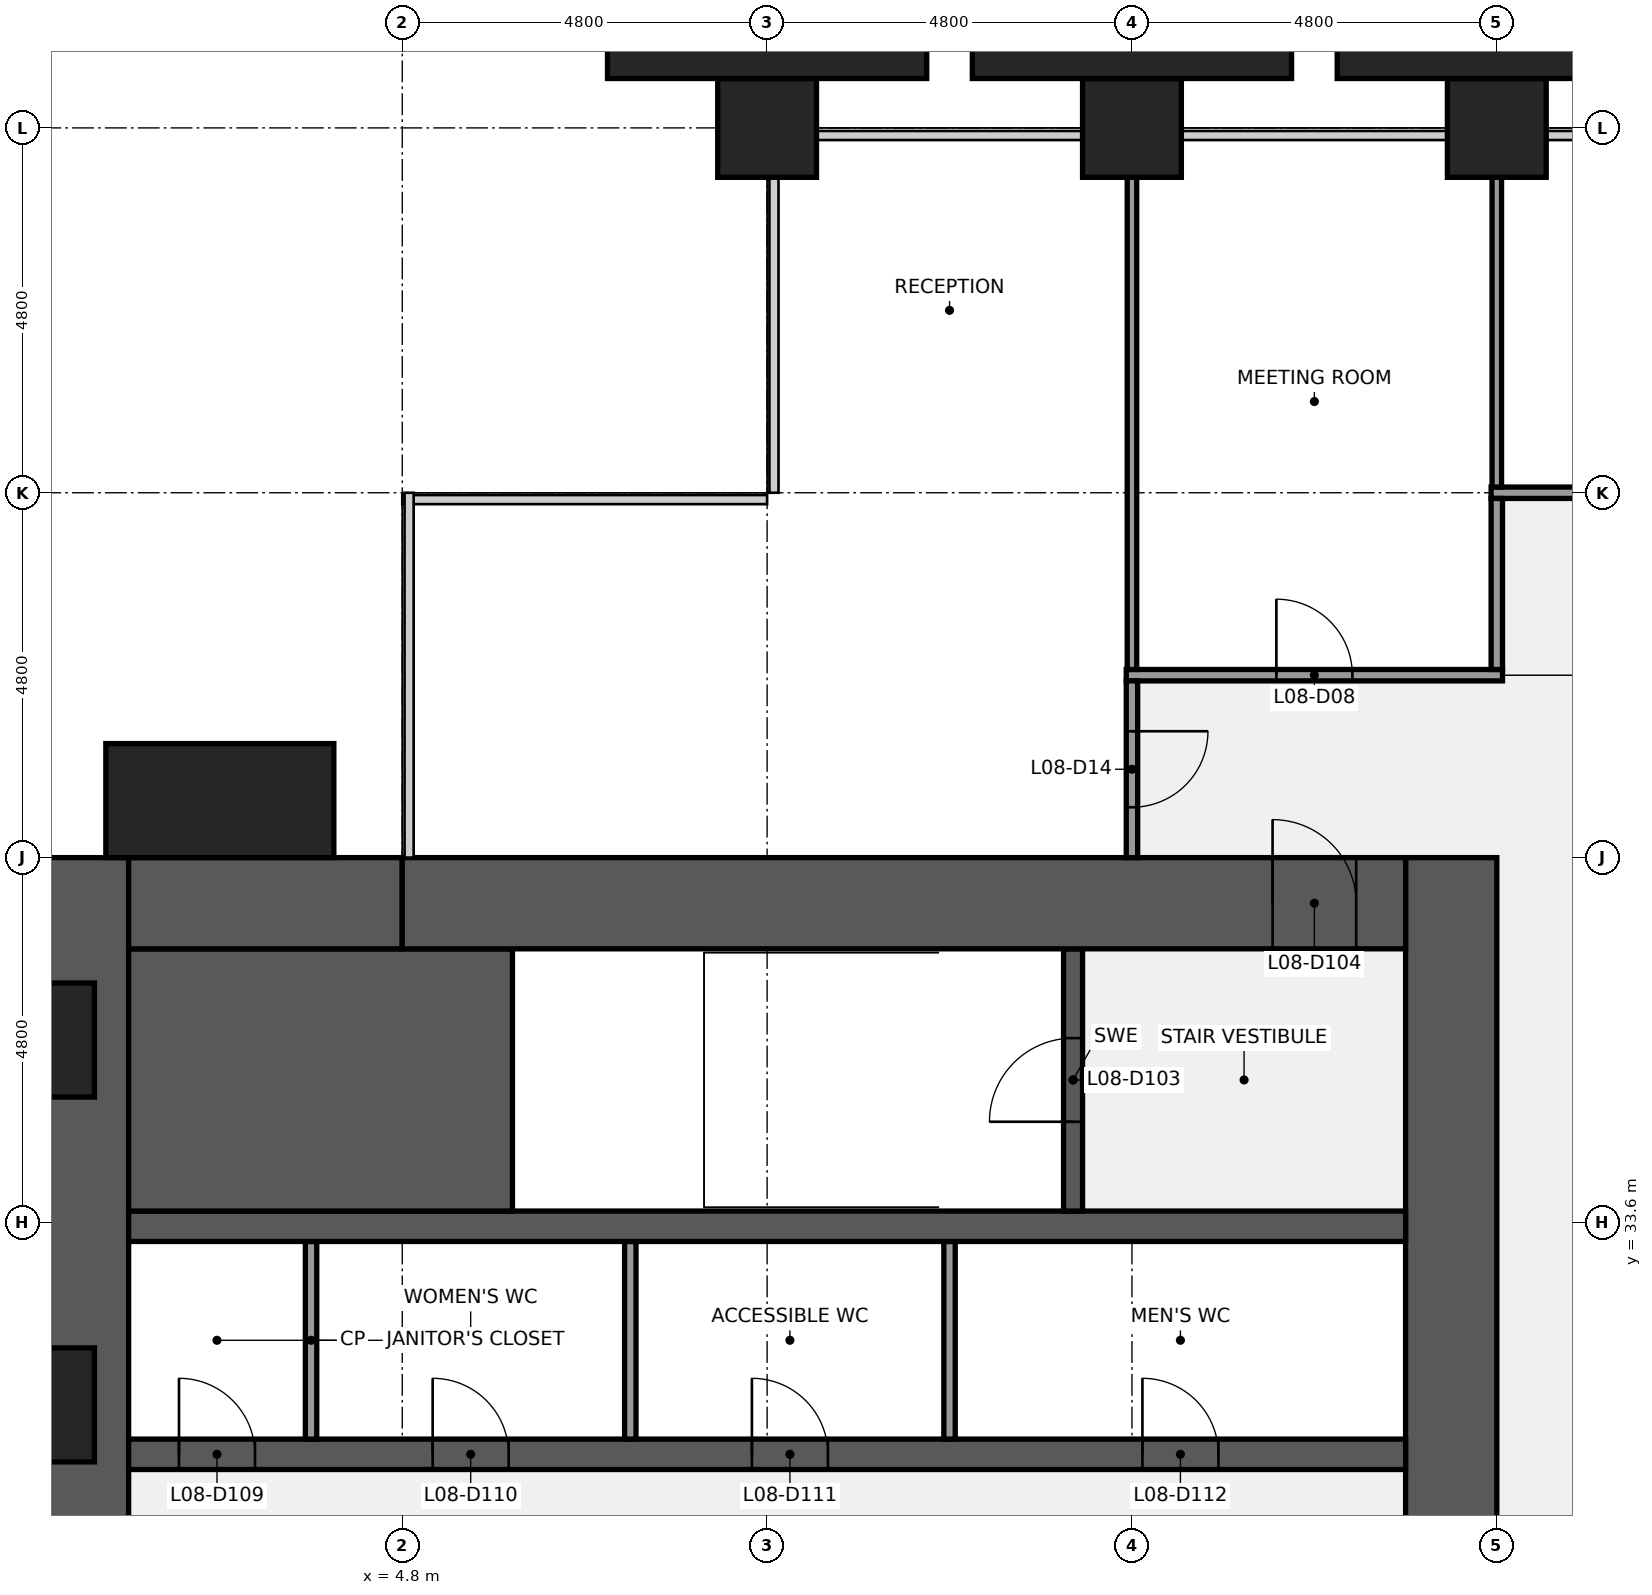
"""IFC4 building model, lengths in metres.
Left out: names, types, materials, properties, quantities, classifications, styles, units other than length and angle.
Written with IfcOpenShell. Run it as: python <this file> out.ifc"""

import sys

from ifc_helpers import new_model, si_unit, direction, frame, frame_2d, origin, origin_2d, place, context, subcontext, project, spatial, rectangle, extrude, element, fill, save


model = new_model("IFC4")
c1 = context("Model", 3, precision=1e-05, world=origin(), true_north=direction((0.0, 1.0)))
c2 = subcontext(c1, "Body", "Model", "MODEL_VIEW")
j1 = project(units=[si_unit("LENGTHUNIT", "METRE"), si_unit("PLANEANGLEUNIT", "RADIAN")], contexts=[c1])
p1 = place(None, origin())
s1 = spatial("IfcSite", under=j1, at=p1, CompositionType="ELEMENT")
p2 = place(p1, origin())
s2 = spatial("IfcBuilding", under=s1, at=p2, CompositionType="ELEMENT")
p3 = place(p2, frame((0.0, 0.0, 43.0)))
s3 = spatial("IfcBuildingStorey", under=s2, at=p3, CompositionType="ELEMENT", Elevation=43.0)
for number, where, z_axis, x_axis in (
    (1, (9.6, 48.0, 0.0), (0.0, 0.0, 1.0), (1.0, 0.0, 0.0)),
    (2, (14.4, 48.0, 0.0), (0.0, 0.0, 1.0), (1.0, 0.0, 0.0)),
    (3, (19.2, 48.0, 0.0), (0.0, 0.0, 1.0), (1.0, 0.0, 0.0)),
):
    element("IfcColumn", number, at=place(p3, frame(where, z_axis=z_axis, x_axis=x_axis)), inside=s3, PredefinedType="COLUMN", context=c2, shape_type="SweptSolid", body=[
        extrude(rectangle(XDim=1.3, YDim=1.3, at=origin_2d()), origin(), (0.0, 0.0, 1.0), 4.0),
    ])
p4 = place(p3, frame((0.6, 9.6, 0.0), z_axis=(0.0, 0.0, 1.0), x_axis=(0.0, 1.0, 0.0)))
e4 = element("IfcWall", 4, at=p4, inside=s3, PredefinedType="SHEAR", context=c2, shape_type="SweptSolid", body=[
    extrude(rectangle(XDim=28.8, YDim=1.2, at=frame_2d((14.4, 0.0))), origin(), (0.0, 0.0, 1.0), 3.84),
])
p5 = place(p4, frame((8.85, 0.0, 0.9)))
e5 = element("IfcOpeningElement", 5, at=p5, cuts=e4, PredefinedType="OPENING", context=c2, shape_type="SweptSolid", body=[
    extrude(rectangle(XDim=1.5, YDim=1.5, at=frame_2d((0.75, 0.75))), frame((0.0, 0.61, 0.0), z_axis=(0.0, -1.0, 0.0), x_axis=(1.0, 0.0, 0.0)), (0.0, 0.0, 1.0), 1.22),
])
p6 = place(p4, frame((18.45, 0.0, 0.9)))
e6 = element("IfcOpeningElement", 6, at=p6, cuts=e4, PredefinedType="OPENING", context=c2, shape_type="SweptSolid", body=[
    extrude(rectangle(XDim=1.5, YDim=1.5, at=frame_2d((0.75, 0.75))), frame((0.0, 0.61, 0.0), z_axis=(0.0, -1.0, 0.0), x_axis=(1.0, 0.0, 0.0)), (0.0, 0.0, 1.0), 1.22),
])
p7 = place(p3, frame((18.6, 38.4, 0.0), z_axis=(0.0, 0.0, 1.0), x_axis=(0.0, -1.0, 0.0)))
e7 = element("IfcWall", 7, at=p7, inside=s3, PredefinedType="SHEAR", context=c2, shape_type="SweptSolid", body=[
    extrude(rectangle(XDim=28.8, YDim=1.2, at=frame_2d((14.4, 0.0))), origin(), (0.0, 0.0, 1.0), 3.84),
])
p8 = place(p7, frame((18.3, 0.0, 0.0)))
e8 = element("IfcOpeningElement", 8, at=p8, cuts=e7, PredefinedType="OPENING", context=c2, shape_type="SweptSolid", body=[
    extrude(rectangle(XDim=1.8, YDim=2.1, at=frame_2d((0.9, 1.05))), frame((0.0, 0.61, 0.0), z_axis=(0.0, -1.0, 0.0), x_axis=(1.0, 0.0, 0.0)), (0.0, 0.0, 1.0), 1.22),
])
p9 = place(p7, frame((8.7, 0.0, 0.0)))
e9 = element("IfcOpeningElement", 9, at=p9, cuts=e7, PredefinedType="OPENING", context=c2, shape_type="SweptSolid", body=[
    extrude(rectangle(XDim=1.8, YDim=2.1, at=frame_2d((0.9, 1.05))), frame((0.0, 0.61, 0.0), z_axis=(0.0, -1.0, 0.0), x_axis=(1.0, 0.0, 0.0)), (0.0, 0.0, 1.0), 1.22),
])
p10 = place(p3, frame((1.2, 30.55, 0.0), z_axis=(0.0, 0.0, 1.0), x_axis=(1.0, 0.0, 0.0)))
e10 = element("IfcWall", 10, at=p10, inside=s3, PredefinedType="SHEAR", context=c2, shape_type="SweptSolid", body=[
    extrude(rectangle(XDim=16.8, YDim=0.4, at=frame_2d((8.4, 0.0))), origin(), (0.0, 0.0, 1.0), 3.84),
])
p11 = place(p10, frame((0.663, 0.0, 0.0)))
e11 = element("IfcOpeningElement", 11, at=p11, cuts=e10, PredefinedType="OPENING", context=c2, shape_type="SweptSolid", body=[
    extrude(rectangle(XDim=1.0, YDim=2.1, at=frame_2d((0.5, 1.05))), frame((0.0, 0.21, 0.0), z_axis=(0.0, -1.0, 0.0), x_axis=(1.0, 0.0, 0.0)), (0.0, 0.0, 1.0), 0.42),
])
p12 = place(p10, frame((4.0, 0.0, 0.0)))
e12 = element("IfcOpeningElement", 12, at=p12, cuts=e10, PredefinedType="OPENING", context=c2, shape_type="SweptSolid", body=[
    extrude(rectangle(XDim=1.0, YDim=2.1, at=frame_2d((0.5, 1.05))), frame((0.0, 0.21, 0.0), z_axis=(0.0, -1.0, 0.0), x_axis=(1.0, 0.0, 0.0)), (0.0, 0.0, 1.0), 0.42),
])
p13 = place(p10, frame((8.2, 0.0, 0.0)))
e13 = element("IfcOpeningElement", 13, at=p13, cuts=e10, PredefinedType="OPENING", context=c2, shape_type="SweptSolid", body=[
    extrude(rectangle(XDim=1.0, YDim=2.1, at=frame_2d((0.5, 1.05))), frame((0.0, 0.21, 0.0), z_axis=(0.0, -1.0, 0.0), x_axis=(1.0, 0.0, 0.0)), (0.0, 0.0, 1.0), 0.42),
])
p14 = place(p10, frame((13.337, 0.0, 0.0)))
e14 = element("IfcOpeningElement", 14, at=p14, cuts=e10, PredefinedType="OPENING", context=c2, shape_type="SweptSolid", body=[
    extrude(rectangle(XDim=1.0, YDim=2.1, at=frame_2d((0.5, 1.05))), frame((0.0, 0.21, 0.0), z_axis=(0.0, -1.0, 0.0), x_axis=(1.0, 0.0, 0.0)), (0.0, 0.0, 1.0), 0.42),
])
for number, where, z_axis, x_axis in (
    (15, (3.6, 30.75, 0.0), (0.0, 0.0, 1.0), (0.0, 1.0, 0.0)),
    (16, (7.8, 30.75, 0.0), (0.0, 0.0, 1.0), (0.0, 1.0, 0.0)),
    (17, (12.0, 30.75, 0.0), (0.0, 0.0, 1.0), (0.0, 1.0, 0.0)),
):
    element("IfcWall", number, at=place(p3, frame(where, z_axis=z_axis, x_axis=x_axis)), inside=s3, PredefinedType="PARTITIONING", context=c2, shape_type="SweptSolid", body=[
        extrude(rectangle(XDim=2.6, YDim=0.15, at=frame_2d((1.3, 0.0))), origin(), (0.0, 0.0, 1.0), 3.84),
    ])
p15 = place(p3, frame((1.2, 33.55, 0.0), z_axis=(0.0, 0.0, 1.0), x_axis=(1.0, 0.0, 0.0)))
e18 = element("IfcWall", 18, at=p15, inside=s3, PredefinedType="SHEAR", context=c2, shape_type="SweptSolid", body=[
    extrude(rectangle(XDim=16.8, YDim=0.4, at=frame_2d((8.4, 0.0))), origin(), (0.0, 0.0, 1.0), 3.84),
])
p16 = place(p3, frame((1.2, 35.475, 0.0), z_axis=(0.0, 0.0, 1.0), x_axis=(1.0, 0.0, 0.0)))
e19 = element("IfcWall", 19, at=p16, inside=s3, PredefinedType="SHEAR", context=c2, shape_type="SweptSolid", body=[
    extrude(rectangle(XDim=5.05, YDim=3.45, at=frame_2d((2.525, 0.0))), origin(), (0.0, 0.0, 1.0), 3.84),
])
p17 = place(p3, frame((13.625, 33.75, 0.0), z_axis=(0.0, 0.0, 1.0), x_axis=(0.0, 1.0, 0.0)))
e20 = element("IfcWall", 20, at=p17, inside=s3, PredefinedType="SHEAR", context=c2, shape_type="SweptSolid", body=[
    extrude(rectangle(XDim=3.45, YDim=0.25, at=frame_2d((1.725, 0.0))), origin(), (0.0, 0.0, 1.0), 3.84),
])
p18 = place(p17, frame((1.175, 0.0, 0.0)))
e21 = element("IfcOpeningElement", 21, at=p18, cuts=e20, PredefinedType="OPENING", context=c2, shape_type="SweptSolid", body=[
    extrude(rectangle(XDim=1.1, YDim=2.1, at=frame_2d((0.55, 1.05))), frame((0.0, 0.135, 0.0), z_axis=(0.0, -1.0, 0.0), x_axis=(1.0, 0.0, 0.0)), (0.0, 0.0, 1.0), 0.27),
])
p19 = place(p3, frame((1.2, 37.8, 0.0), z_axis=(0.0, 0.0, 1.0), x_axis=(1.0, 0.0, 0.0)))
e22 = element("IfcWall", 22, at=p19, inside=s3, PredefinedType="SHEAR", context=c2, shape_type="SweptSolid", body=[
    extrude(rectangle(XDim=3.6, YDim=1.2, at=frame_2d((1.8, 0.0))), origin(), (0.0, 0.0, 1.0), 3.84),
])
p20 = place(p3, frame((4.8, 37.8, 0.0), z_axis=(0.0, 0.0, 1.0), x_axis=(1.0, 0.0, 0.0)))
e23 = element("IfcWall", 23, at=p20, inside=s3, PredefinedType="SHEAR", context=c2, shape_type="SweptSolid", body=[
    extrude(rectangle(XDim=13.2, YDim=1.2, at=frame_2d((6.6, 0.0))), origin(), (0.0, 0.0, 1.0), 3.84),
])
p21 = place(p20, frame((11.45, 0.0, 0.0)))
e24 = element("IfcOpeningElement", 24, at=p21, cuts=e23, PredefinedType="OPENING", context=c2, shape_type="SweptSolid", body=[
    extrude(rectangle(XDim=1.1, YDim=2.1, at=frame_2d((0.55, 1.05))), frame((0.0, 0.61, 0.0), z_axis=(0.0, -1.0, 0.0), x_axis=(1.0, 0.0, 0.0)), (0.0, 0.0, 1.0), 1.22),
])
p22 = place(p3, frame((14.325, 40.8, 0.0), z_axis=(0.0, 0.0, 1.0), x_axis=(1.0, 0.0, 0.0)))
e25 = element("IfcWall", 25, at=p22, inside=s3, PredefinedType="PARTITIONING", context=c2, shape_type="SweptSolid", body=[
    extrude(rectangle(XDim=4.95, YDim=0.15, at=frame_2d((2.475, 0.0))), origin(), (0.0, 0.0, 1.0), 2.849),
])
p23 = place(p22, frame((1.975, 0.0, 0.0)))
e26 = element("IfcOpeningElement", 26, at=p23, cuts=e25, PredefinedType="OPENING", context=c2, shape_type="SweptSolid", body=[
    extrude(rectangle(XDim=1.0, YDim=2.1, at=frame_2d((0.5, 1.05))), frame((0.0, 0.085, 0.0), z_axis=(0.0, -1.0, 0.0), x_axis=(1.0, 0.0, 0.0)), (0.0, 0.0, 1.0), 0.17),
])
p24 = place(p3, frame((19.125, 43.2, 0.0), z_axis=(0.0, 0.0, 1.0), x_axis=(1.0, 0.0, 0.0)))
e27 = element("IfcWall", 27, at=p24, inside=s3, PredefinedType="PARTITIONING", context=c2, shape_type="SweptSolid", body=[
    extrude(rectangle(XDim=19.35, YDim=0.15, at=frame_2d((9.675, 0.0))), origin(), (0.0, 0.0, 1.0), 2.849),
])
p25 = place(p24, frame((9.175, 0.0, 0.0)))
e28 = element("IfcOpeningElement", 28, at=p25, cuts=e27, PredefinedType="OPENING", context=c2, shape_type="SweptSolid", body=[
    extrude(rectangle(XDim=1.0, YDim=2.1, at=frame_2d((0.5, 1.05))), frame((0.0, 0.085, 0.0), z_axis=(0.0, -1.0, 0.0), x_axis=(1.0, 0.0, 0.0)), (0.0, 0.0, 1.0), 0.17),
])
p26 = place(p3, frame((14.4, 40.875, 0.0), z_axis=(0.0, 0.0, 1.0), x_axis=(0.0, 1.0, 0.0)))
e29 = element("IfcWall", 29, at=p26, inside=s3, PredefinedType="PARTITIONING", context=c2, shape_type="SweptSolid", body=[
    extrude(rectangle(XDim=6.475, YDim=0.125, at=frame_2d((3.238, 0.0))), origin(), (0.0, 0.0, 1.0), 2.849),
])
p27 = place(p3, frame((14.4, 38.4, 0.0), z_axis=(0.0, 0.0, 1.0), x_axis=(0.0, 1.0, 0.0)))
e30 = element("IfcWall", 30, at=p27, inside=s3, PredefinedType="PARTITIONING", context=c2, shape_type="SweptSolid", body=[
    extrude(rectangle(XDim=2.325, YDim=0.15, at=frame_2d((1.163, 0.0))), origin(), (0.0, 0.0, 1.0), 2.849),
])
p28 = place(p27, frame((0.663, 0.0, 0.0)))
e31 = element("IfcOpeningElement", 31, at=p28, cuts=e30, PredefinedType="OPENING", context=c2, shape_type="SweptSolid", body=[
    extrude(rectangle(XDim=1.0, YDim=2.1, at=frame_2d((0.5, 1.05))), frame((0.0, 0.085, 0.0), z_axis=(0.0, -1.0, 0.0), x_axis=(1.0, 0.0, 0.0)), (0.0, 0.0, 1.0), 0.17),
])
p29 = place(p3, frame((19.2, 43.275, 0.0), z_axis=(0.0, 0.0, 1.0), x_axis=(0.0, 1.0, 0.0)))
e32 = element("IfcWall", 32, at=p29, inside=s3, PredefinedType="PARTITIONING", context=c2, shape_type="SweptSolid", body=[
    extrude(rectangle(XDim=4.075, YDim=0.125, at=frame_2d((2.038, 0.0))), origin(), (0.0, 0.0, 1.0), 2.849),
])
p30 = place(p3, frame((19.2, 40.875, 0.0), z_axis=(0.0, 0.0, 1.0), x_axis=(0.0, 1.0, 0.0)))
e33 = element("IfcWall", 33, at=p30, inside=s3, PredefinedType="PARTITIONING", context=c2, shape_type="SweptSolid", body=[
    extrude(rectangle(XDim=2.25, YDim=0.15, at=frame_2d((1.125, 0.0))), origin(), (0.0, 0.0, 1.0), 2.849),
])
p31 = place(p3, frame((2.4, 39.15, 0.0), z_axis=(0.0, 0.0, 1.0), x_axis=(1.0, 0.0, 0.0)))
e34 = element("IfcColumn", 34, at=p31, inside=s3, PredefinedType="PILASTER", context=c2, shape_type="SweptSolid", body=[
    extrude(rectangle(XDim=3.0, YDim=1.5, at=origin_2d()), origin(), (0.0, 0.0, 1.0), 4.0),
])
for number, where, z_axis, x_axis in (
    (35, (9.6, 49.075, 0.0), (0.0, 0.0, 1.0), (1.0, 0.0, 0.0)),
    (36, (14.4, 49.075, 0.0), (0.0, 0.0, 1.0), (1.0, 0.0, 0.0)),
    (37, (19.2, 49.075, 0.0), (0.0, 0.0, 1.0), (1.0, 0.0, 0.0)),
):
    element("IfcColumn", number, at=place(p3, frame(where, z_axis=z_axis, x_axis=x_axis)), inside=s3, PredefinedType="PILASTER", context=c2, shape_type="SweptSolid", body=[
        extrude(rectangle(XDim=4.2, YDim=0.85, at=origin_2d()), origin(), (0.0, 0.0, 1.0), 4.0),
    ])
p32 = place(p18, origin())
e38 = element("IfcDoor", 38, at=p32, inside=s3, OperationType="SINGLE_SWING_LEFT", PredefinedType="DOOR", context=c2, shape_type="SweptSolid", body=[
    extrude(rectangle(XDim=1.1, YDim=2.1, at=frame_2d((0.55, 1.05))), frame((0.0, 0.025, 0.0), z_axis=(0.0, -1.0, 0.0), x_axis=(1.0, 0.0, 0.0)), (0.0, 0.0, 1.0), 0.05),
])
fill(e21, e38)
p33 = place(p21, origin())
e39 = element("IfcDoor", 39, at=p33, inside=s3, OperationType="SINGLE_SWING_LEFT", PredefinedType="DOOR", context=c2, shape_type="SweptSolid", body=[
    extrude(rectangle(XDim=1.1, YDim=2.1, at=frame_2d((0.55, 1.05))), frame((0.0, 0.025, 0.0), z_axis=(0.0, -1.0, 0.0), x_axis=(1.0, 0.0, 0.0)), (0.0, 0.0, 1.0), 0.05),
])
fill(e24, e39)
p34 = place(p11, origin())
e40 = element("IfcDoor", 40, at=p34, inside=s3, OperationType="SINGLE_SWING_LEFT", PredefinedType="DOOR", context=c2, shape_type="SweptSolid", body=[
    extrude(rectangle(XDim=1.0, YDim=2.1, at=frame_2d((0.5, 1.05))), frame((0.0, 0.025, 0.0), z_axis=(0.0, -1.0, 0.0), x_axis=(1.0, 0.0, 0.0)), (0.0, 0.0, 1.0), 0.05),
])
fill(e11, e40)
p35 = place(p12, origin())
e41 = element("IfcDoor", 41, at=p35, inside=s3, OperationType="SINGLE_SWING_LEFT", PredefinedType="DOOR", context=c2, shape_type="SweptSolid", body=[
    extrude(rectangle(XDim=1.0, YDim=2.1, at=frame_2d((0.5, 1.05))), frame((0.0, 0.025, 0.0), z_axis=(0.0, -1.0, 0.0), x_axis=(1.0, 0.0, 0.0)), (0.0, 0.0, 1.0), 0.05),
])
fill(e12, e41)
p36 = place(p13, origin())
e42 = element("IfcDoor", 42, at=p36, inside=s3, OperationType="SINGLE_SWING_LEFT", PredefinedType="DOOR", context=c2, shape_type="SweptSolid", body=[
    extrude(rectangle(XDim=1.0, YDim=2.1, at=frame_2d((0.5, 1.05))), frame((0.0, 0.025, 0.0), z_axis=(0.0, -1.0, 0.0), x_axis=(1.0, 0.0, 0.0)), (0.0, 0.0, 1.0), 0.05),
])
fill(e13, e42)
p37 = place(p14, origin())
e43 = element("IfcDoor", 43, at=p37, inside=s3, OperationType="SINGLE_SWING_LEFT", PredefinedType="DOOR", context=c2, shape_type="SweptSolid", body=[
    extrude(rectangle(XDim=1.0, YDim=2.1, at=frame_2d((0.5, 1.05))), frame((0.0, 0.025, 0.0), z_axis=(0.0, -1.0, 0.0), x_axis=(1.0, 0.0, 0.0)), (0.0, 0.0, 1.0), 0.05),
])
fill(e14, e43)
p38 = place(p23, origin())
e44 = element("IfcDoor", 44, at=p38, inside=s3, OperationType="SINGLE_SWING_LEFT", PredefinedType="DOOR", context=c2, shape_type="SweptSolid", body=[
    extrude(rectangle(XDim=1.0, YDim=2.1, at=frame_2d((0.5, 1.05))), frame((0.0, 0.025, 0.0), z_axis=(0.0, -1.0, 0.0), x_axis=(1.0, 0.0, 0.0)), (0.0, 0.0, 1.0), 0.05),
])
fill(e26, e44)
p39 = place(p28, origin())
e45 = element("IfcDoor", 45, at=p39, inside=s3, OperationType="SINGLE_SWING_RIGHT", PredefinedType="DOOR", context=c2, shape_type="SweptSolid", body=[
    extrude(rectangle(XDim=1.0, YDim=2.1, at=frame_2d((0.5, 1.05))), frame((0.0, 0.025, 0.0), z_axis=(0.0, -1.0, 0.0), x_axis=(1.0, 0.0, 0.0)), (0.0, 0.0, 1.0), 0.05),
])
fill(e31, e45)
save(model, sys.argv[1])
